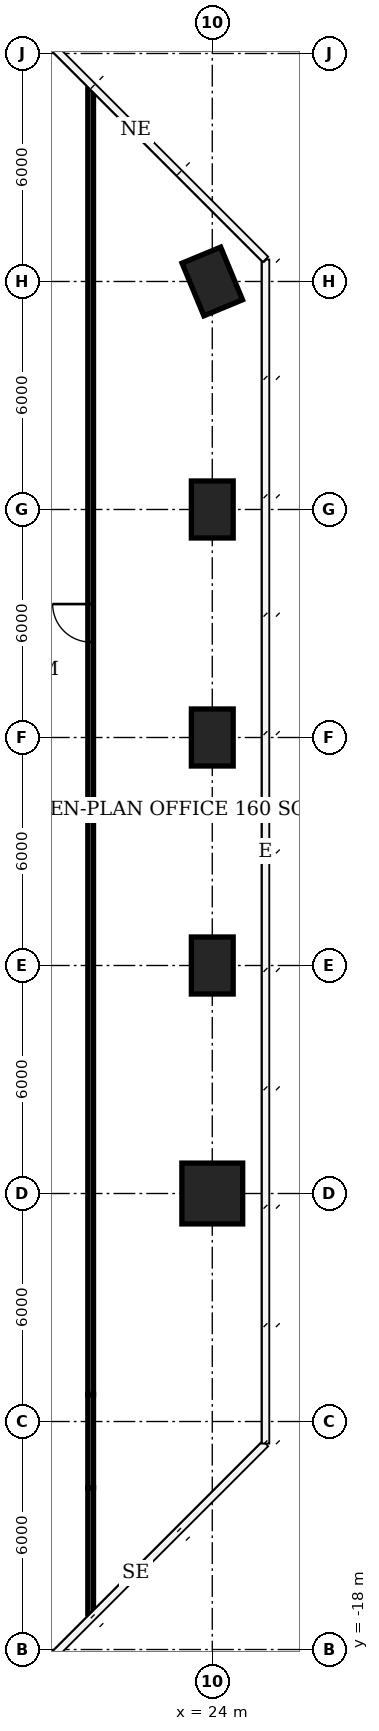
"""IFC4 building model, lengths in metres.
Left out: names, types, materials, properties, quantities, classifications, styles, units other than length and angle.
Written with IfcOpenShell. Run it as: python <this file> out.ifc"""

import sys

from ifc_helpers import new_model, si_unit, direction, frame, frame_2d, origin, origin_2d, place, context, subcontext, project, spatial, rectangle, extrude, element, fill, save


model = new_model("IFC4")
c1 = context("Model", 3, precision=1e-05, world=origin(), true_north=direction((0.0, 1.0)))
c2 = subcontext(c1, "Body", "Model", "MODEL_VIEW")
j1 = project(units=[si_unit("LENGTHUNIT", "METRE"), si_unit("PLANEANGLEUNIT", "RADIAN")], contexts=[c1])
p1 = place(None, origin())
s1 = spatial("IfcSite", under=j1, at=p1, CompositionType="ELEMENT")
p2 = place(p1, origin())
s2 = spatial("IfcBuilding", under=s1, at=p2, CompositionType="ELEMENT")
p3 = place(p2, frame((0.0, 0.0, 216.2)))
s3 = spatial("IfcBuildingStorey", under=s2, at=p3, CompositionType="ELEMENT", Elevation=216.2)
p4 = place(p3, frame((24.0, -6.0, 0.0), z_axis=(0.0, 0.0, 1.0), x_axis=(1.0, 0.0, 0.0)))
e1 = element("IfcColumn", 1, at=p4, inside=s3, PredefinedType="COLUMN", context=c2, shape_type="SweptSolid", body=[
    extrude(rectangle(XDim=1.6, YDim=1.6, at=origin_2d()), origin(), (0.0, 0.0, 1.0), 3.9),
])
for number, where, z_axis, x_axis in (
    (2, (24.0, 0.0, 0.0), (0.0, 0.0, 1.0), (0.0, 1.0, 0.0)),
    (3, (24.0, 6.0, 0.0), (0.0, 0.0, 1.0), (0.0, 1.0, 0.0)),
    (4, (24.0, 12.0, 0.0), (0.0, 0.0, 1.0), (0.0, 1.0, 0.0)),
    (5, (24.0, 18.0, 0.0), (0.0, 0.0, 1.0), (0.383, -0.924, 0.0)),
):
    element("IfcColumn", number, at=place(p3, frame(where, z_axis=z_axis, x_axis=x_axis)), inside=s3, PredefinedType="COLUMN", context=c2, shape_type="SweptSolid", body=[
        extrude(rectangle(XDim=1.5, YDim=1.1, at=origin_2d()), origin(), (0.0, 0.0, 1.0), 3.9),
    ])
p5 = place(p3, frame((20.8, -17.064, 0.0), z_axis=(0.0, 0.0, 1.0), x_axis=(0.0, 1.0, 0.0)))
e6 = element("IfcWall", 6, at=p5, inside=s3, PredefinedType="PARTITIONING", context=c2, shape_type="SweptSolid", body=[
    extrude(rectangle(XDim=3.324, YDim=0.15, at=frame_2d((1.662, 0.0))), origin(), (0.0, 0.0, 1.0), 3.65),
])
p6 = place(p3, frame((20.8, -13.74, 0.0), z_axis=(0.0, 0.0, 1.0), x_axis=(0.0, 1.0, 0.0)))
e7 = element("IfcWall", 7, at=p6, inside=s3, PredefinedType="PARTITIONING", context=c2, shape_type="SweptSolid", body=[
    extrude(rectangle(XDim=2.45, YDim=0.15, at=frame_2d((1.225, 0.0))), origin(), (0.0, 0.0, 1.0), 2.65),
])
p7 = place(p3, frame((20.8, -11.29, 0.0), z_axis=(0.0, 0.0, 1.0), x_axis=(0.0, 1.0, 0.0)))
e8 = element("IfcWall", 8, at=p7, inside=s3, PredefinedType="PARTITIONING", context=c2, shape_type="SweptSolid", body=[
    extrude(rectangle(XDim=34.354, YDim=0.15, at=frame_2d((17.177, 0.0))), origin(), (0.0, 0.0, 1.0), 3.65),
])
p8 = place(p7, frame((19.801, 0.0, 0.0)))
e9 = element("IfcOpeningElement", 9, at=p8, cuts=e8, PredefinedType="OPENING", context=c2, shape_type="SweptSolid", body=[
    extrude(rectangle(XDim=1.0, YDim=2.1, at=frame_2d((0.5, 1.05))), frame((0.0, 0.085, 0.0), z_axis=(0.0, -1.0, 0.0), x_axis=(1.0, 0.0, 0.0)), (0.0, 0.0, 1.0), 0.17),
])
p9 = place(p8, origin())
e10 = element("IfcDoor", 10, at=p9, inside=s3, OperationType="SINGLE_SWING_RIGHT", PredefinedType="DOOR", context=c2, shape_type="SweptSolid", body=[
    extrude(rectangle(XDim=1.0, YDim=2.1, at=frame_2d((0.5, 1.05))), frame((0.0, 0.025, 0.0), z_axis=(0.0, -1.0, 0.0), x_axis=(1.0, 0.0, 0.0)), (0.0, 0.0, 1.0), 0.05),
])
fill(e9, e10)
save(model, sys.argv[1])
